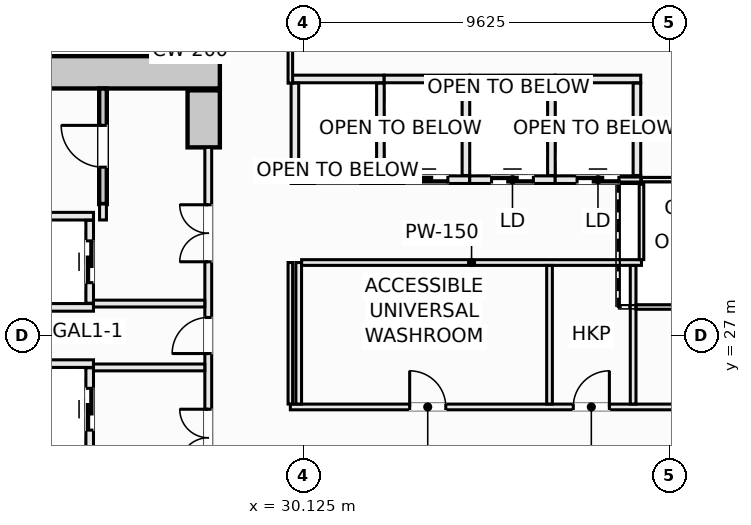
"""IFC4 building model, lengths in metres.
Left out: names, types, materials, properties, quantities, classifications, styles, units other than length and angle.
Written with IfcOpenShell. Run it as: python <this file> out.ifc"""

import sys

from ifc_helpers import new_model, si_unit, direction, frame, frame_2d, origin, place, context, subcontext, project, spatial, rectangle, extrude, element, fill, save


model = new_model("IFC4")
c1 = context("Model", 3, precision=1e-05, world=origin(), true_north=direction((0.0, 1.0)))
c2 = subcontext(c1, "Body", "Model", "MODEL_VIEW")
j1 = project(units=[si_unit("LENGTHUNIT", "METRE"), si_unit("PLANEANGLEUNIT", "RADIAN")], contexts=[c1])
p1 = place(None, origin())
s1 = spatial("IfcSite", under=j1, at=p1, CompositionType="ELEMENT")
p2 = place(p1, origin())
s2 = spatial("IfcBuilding", under=s1, at=p2, CompositionType="ELEMENT")
p3 = place(p2, frame((0.0, 0.0, 10.0)))
s3 = spatial("IfcBuildingStorey", under=s2, at=p3, CompositionType="ELEMENT", Elevation=10.0)
p4 = place(p3, frame((14.075, 33.925, -0.26), z_axis=(0.0, 0.0, 1.0), x_axis=(1.0, 0.0, 0.0)))
e1 = element("IfcWall", 1, at=p4, inside=s3, PredefinedType="SHEAR", context=c2, shape_type="SweptSolid", body=[
    extrude(rectangle(XDim=13.85, YDim=0.85, at=frame_2d((6.925, 0.0))), origin(), (0.0, 0.0, 1.0), 5.02),
])
p5 = place(p3, frame((27.5, 31.95, -0.26), z_axis=(0.0, 0.0, 1.0), x_axis=(0.0, 1.0, 0.0)))
e2 = element("IfcWall", 2, at=p5, inside=s3, PredefinedType="SHEAR", context=c2, shape_type="SweptSolid", body=[
    extrude(rectangle(XDim=1.5, YDim=0.85, at=frame_2d((0.75, 0.0))), origin(), (0.0, 0.0, 1.0), 5.02),
])
p6 = place(p3, frame((24.85, 30.46, -0.26), z_axis=(0.0, 0.0, 1.0), x_axis=(0.0, 1.0, 0.0)))
e3 = element("IfcWall", 3, at=p6, inside=s3, PredefinedType="SHEAR", context=c2, shape_type="SweptSolid", body=[
    extrude(rectangle(XDim=3.038, YDim=0.2, at=frame_2d((1.519, 0.0))), origin(), (0.0, 0.0, 1.0), 5.02),
])
p7 = place(p6, frame((0.969, 0.0, 0.26)))
e4 = element("IfcOpeningElement", 4, at=p7, cuts=e3, PredefinedType="OPENING", context=c2, shape_type="SweptSolid", body=[
    extrude(rectangle(XDim=1.1, YDim=2.15, at=frame_2d((0.55, 1.075))), frame((0.0, 0.11, 0.0), z_axis=(0.0, -1.0, 0.0), x_axis=(1.0, 0.0, 0.0)), (0.0, 0.0, 1.0), 0.22),
])
for number, where, z_axis, x_axis in (
    (5, (22.15, 30.14, 0.0), (0.0, 0.0, 1.0), (1.0, 0.0, 0.0)),
    (6, (22.15, 27.74, 0.0), (0.0, 0.0, 1.0), (1.0, 0.0, 0.0)),
):
    element("IfcWall", number, at=place(p3, frame(where, z_axis=z_axis, x_axis=x_axis)), inside=s3, PredefinedType="SOLIDWALL", context=c2, shape_type="SweptSolid", body=[
        extrude(rectangle(XDim=2.45, YDim=0.2, at=frame_2d((1.225, 0.0))), origin(), (0.0, 0.0, 1.0), 4.76),
    ])
p8 = place(p3, frame((24.5, 27.85, 0.0), z_axis=(0.0, 0.0, 1.0), x_axis=(0.0, 1.0, 0.0)))
e7 = element("IfcWall", 7, at=p8, inside=s3, PredefinedType="SOLIDWALL", context=c2, shape_type="SweptSolid", body=[
    extrude(rectangle(XDim=2.18, YDim=0.2, at=frame_2d((1.09, 0.0))), origin(), (0.0, 0.0, 1.0), 4.76),
])
p9 = place(p8, frame((0.54, 0.0, 0.0)))
e8 = element("IfcOpeningElement", 8, at=p9, cuts=e7, PredefinedType="OPENING", context=c2, shape_type="SweptSolid", body=[
    extrude(rectangle(XDim=1.1, YDim=2.2, at=frame_2d((0.55, 1.1))), frame((0.0, 0.11, 0.0), z_axis=(0.0, -1.0, 0.0), x_axis=(1.0, 0.0, 0.0)), (0.0, 0.0, 1.0), 0.22),
])
p10 = place(p3, frame((22.15, 26.26, 0.0), z_axis=(0.0, 0.0, 1.0), x_axis=(1.0, 0.0, 0.0)))
e9 = element("IfcWall", 9, at=p10, inside=s3, PredefinedType="SOLIDWALL", context=c2, shape_type="SweptSolid", body=[
    extrude(rectangle(XDim=2.45, YDim=0.2, at=frame_2d((1.225, 0.0))), origin(), (0.0, 0.0, 1.0), 4.76),
])
p11 = place(p3, frame((24.5, 23.97, 0.0), z_axis=(0.0, 0.0, 1.0), x_axis=(0.0, 1.0, 0.0)))
e10 = element("IfcWall", 10, at=p11, inside=s3, PredefinedType="SOLIDWALL", context=c2, shape_type="SweptSolid", body=[
    extrude(rectangle(XDim=2.18, YDim=0.2, at=frame_2d((1.09, 0.0))), origin(), (0.0, 0.0, 1.0), 4.76),
])
p12 = place(p11, frame((0.54, 0.0, 0.0)))
e11 = element("IfcOpeningElement", 11, at=p12, cuts=e10, PredefinedType="OPENING", context=c2, shape_type="SweptSolid", body=[
    extrude(rectangle(XDim=1.1, YDim=2.2, at=frame_2d((0.55, 1.1))), frame((0.0, 0.11, 0.0), z_axis=(0.0, -1.0, 0.0), x_axis=(1.0, 0.0, 0.0)), (0.0, 0.0, 1.0), 0.22),
])
p13 = place(p3, frame((29.8, 33.75, 0.0), z_axis=(0.0, 0.0, 1.0), x_axis=(1.0, 0.0, 0.0)))
e12 = element("IfcWall", 12, at=p13, inside=s3, PredefinedType="SOLIDWALL", context=c2, shape_type="SweptSolid", body=[
    extrude(rectangle(XDim=2.45, YDim=0.2, at=frame_2d((1.225, 0.0))), origin(), (0.0, 0.0, 1.0), 4.76),
])
p14 = place(p3, frame((29.8, 31.1, 0.0), z_axis=(0.0, 0.0, 1.0), x_axis=(1.0, 0.0, 0.0)))
e13 = element("IfcWall", 13, at=p14, inside=s3, PredefinedType="SOLIDWALL", context=c2, shape_type="SweptSolid", body=[
    extrude(rectangle(XDim=2.45, YDim=0.2, at=frame_2d((1.225, 0.0))), origin(), (0.0, 0.0, 1.0), 4.76),
])
p15 = place(p14, frame((0.675, 0.0, 0.0)))
e14 = element("IfcOpeningElement", 14, at=p15, cuts=e13, PredefinedType="OPENING", context=c2, shape_type="SweptSolid", body=[
    extrude(rectangle(XDim=1.1, YDim=2.2, at=frame_2d((0.55, 1.1))), frame((0.0, 0.11, 0.0), z_axis=(0.0, -1.0, 0.0), x_axis=(1.0, 0.0, 0.0)), (0.0, 0.0, 1.0), 0.22),
])
for number, where, z_axis, x_axis in (
    (15, (29.9, 31.21, 0.0), (0.0, 0.0, 1.0), (0.0, 1.0, 0.0)),
    (16, (32.15, 31.21, 0.0), (0.0, 0.0, 1.0), (0.0, 1.0, 0.0)),
):
    element("IfcWall", number, at=place(p3, frame(where, z_axis=z_axis, x_axis=x_axis)), inside=s3, PredefinedType="SOLIDWALL", context=c2, shape_type="SweptSolid", body=[
        extrude(rectangle(XDim=2.43, YDim=0.2, at=frame_2d((1.215, 0.0))), origin(), (0.0, 0.0, 1.0), 4.76),
    ])
p16 = place(p3, frame((32.25, 33.75, 0.0), z_axis=(0.0, 0.0, 1.0), x_axis=(1.0, 0.0, 0.0)))
e17 = element("IfcWall", 17, at=p16, inside=s3, PredefinedType="SOLIDWALL", context=c2, shape_type="SweptSolid", body=[
    extrude(rectangle(XDim=2.25, YDim=0.2, at=frame_2d((1.125, 0.0))), origin(), (0.0, 0.0, 1.0), 4.76),
])
p17 = place(p3, frame((32.25, 31.1, 0.0), z_axis=(0.0, 0.0, 1.0), x_axis=(1.0, 0.0, 0.0)))
e18 = element("IfcWall", 18, at=p17, inside=s3, PredefinedType="SOLIDWALL", context=c2, shape_type="SweptSolid", body=[
    extrude(rectangle(XDim=2.25, YDim=0.2, at=frame_2d((1.125, 0.0))), origin(), (0.0, 0.0, 1.0), 4.76),
])
p18 = place(p17, frame((0.575, 0.0, 0.0)))
e19 = element("IfcOpeningElement", 19, at=p18, cuts=e18, PredefinedType="OPENING", context=c2, shape_type="SweptSolid", body=[
    extrude(rectangle(XDim=1.1, YDim=2.2, at=frame_2d((0.55, 1.1))), frame((0.0, 0.11, 0.0), z_axis=(0.0, -1.0, 0.0), x_axis=(1.0, 0.0, 0.0)), (0.0, 0.0, 1.0), 0.22),
])
p19 = place(p3, frame((34.4, 31.21, 0.0), z_axis=(0.0, 0.0, 1.0), x_axis=(0.0, 1.0, 0.0)))
e20 = element("IfcWall", 20, at=p19, inside=s3, PredefinedType="SOLIDWALL", context=c2, shape_type="SweptSolid", body=[
    extrude(rectangle(XDim=2.43, YDim=0.2, at=frame_2d((1.215, 0.0))), origin(), (0.0, 0.0, 1.0), 4.76),
])
p20 = place(p3, frame((34.5, 33.75, 0.0), z_axis=(0.0, 0.0, 1.0), x_axis=(1.0, 0.0, 0.0)))
e21 = element("IfcWall", 21, at=p20, inside=s3, PredefinedType="SOLIDWALL", context=c2, shape_type="SweptSolid", body=[
    extrude(rectangle(XDim=2.25, YDim=0.2, at=frame_2d((1.125, 0.0))), origin(), (0.0, 0.0, 1.0), 4.76),
])
p21 = place(p3, frame((34.5, 31.1, 0.0), z_axis=(0.0, 0.0, 1.0), x_axis=(1.0, 0.0, 0.0)))
e22 = element("IfcWall", 22, at=p21, inside=s3, PredefinedType="SOLIDWALL", context=c2, shape_type="SweptSolid", body=[
    extrude(rectangle(XDim=2.25, YDim=0.2, at=frame_2d((1.125, 0.0))), origin(), (0.0, 0.0, 1.0), 4.76),
])
p22 = place(p21, frame((0.575, 0.0, 0.0)))
e23 = element("IfcOpeningElement", 23, at=p22, cuts=e22, PredefinedType="OPENING", context=c2, shape_type="SweptSolid", body=[
    extrude(rectangle(XDim=1.1, YDim=2.2, at=frame_2d((0.55, 1.1))), frame((0.0, 0.11, 0.0), z_axis=(0.0, -1.0, 0.0), x_axis=(1.0, 0.0, 0.0)), (0.0, 0.0, 1.0), 0.22),
])
p23 = place(p3, frame((36.65, 31.21, 0.0), z_axis=(0.0, 0.0, 1.0), x_axis=(0.0, 1.0, 0.0)))
e24 = element("IfcWall", 24, at=p23, inside=s3, PredefinedType="SOLIDWALL", context=c2, shape_type="SweptSolid", body=[
    extrude(rectangle(XDim=2.43, YDim=0.2, at=frame_2d((1.215, 0.0))), origin(), (0.0, 0.0, 1.0), 4.76),
])
p24 = place(p3, frame((36.75, 33.75, 0.0), z_axis=(0.0, 0.0, 1.0), x_axis=(1.0, 0.0, 0.0)))
e25 = element("IfcWall", 25, at=p24, inside=s3, PredefinedType="SOLIDWALL", context=c2, shape_type="SweptSolid", body=[
    extrude(rectangle(XDim=2.25, YDim=0.2, at=frame_2d((1.125, 0.0))), origin(), (0.0, 0.0, 1.0), 4.76),
])
p25 = place(p3, frame((36.75, 31.1, 0.0), z_axis=(0.0, 0.0, 1.0), x_axis=(1.0, 0.0, 0.0)))
e26 = element("IfcWall", 26, at=p25, inside=s3, PredefinedType="SOLIDWALL", context=c2, shape_type="SweptSolid", body=[
    extrude(rectangle(XDim=2.25, YDim=0.2, at=frame_2d((1.125, 0.0))), origin(), (0.0, 0.0, 1.0), 4.76),
])
p26 = place(p25, frame((0.575, 0.0, 0.0)))
e27 = element("IfcOpeningElement", 27, at=p26, cuts=e26, PredefinedType="OPENING", context=c2, shape_type="SweptSolid", body=[
    extrude(rectangle(XDim=1.1, YDim=2.2, at=frame_2d((0.55, 1.1))), frame((0.0, 0.11, 0.0), z_axis=(0.0, -1.0, 0.0), x_axis=(1.0, 0.0, 0.0)), (0.0, 0.0, 1.0), 0.22),
])
p27 = place(p3, frame((38.9, 31.21, 0.0), z_axis=(0.0, 0.0, 1.0), x_axis=(0.0, 1.0, 0.0)))
e28 = element("IfcWall", 28, at=p27, inside=s3, PredefinedType="SOLIDWALL", context=c2, shape_type="SweptSolid", body=[
    extrude(rectangle(XDim=2.43, YDim=0.2, at=frame_2d((1.215, 0.0))), origin(), (0.0, 0.0, 1.0), 4.76),
])
p28 = place(p3, frame((24.85, 30.04, 0.0), z_axis=(0.0, 0.0, 1.0), x_axis=(0.0, 1.0, 0.0)))
e29 = element("IfcWall", 29, at=p28, inside=s3, PredefinedType="SOLIDWALL", context=c2, shape_type="SweptSolid", body=[
    extrude(rectangle(XDim=0.42, YDim=0.18, at=frame_2d((0.21, 0.0))), origin(), (0.0, 0.0, 1.0), 4.76),
])
p29 = place(p3, frame((27.62, 22.05, 0.0), z_axis=(0.0, 0.0, 1.0), x_axis=(0.0, 1.0, 0.0)))
e30 = element("IfcWall", 30, at=p29, inside=s3, PredefinedType="SOLIDWALL", context=c2, shape_type="SweptSolid", body=[
    extrude(rectangle(XDim=9.9, YDim=0.18, at=frame_2d((4.95, 0.0))), origin(), (0.0, 0.0, 1.0), 3.852),
])
p30 = place(p29, frame((4.475, 0.0, 0.0)))
e31 = element("IfcOpeningElement", 31, at=p30, cuts=e30, PredefinedType="OPENING", context=c2, shape_type="SweptSolid", body=[
    extrude(rectangle(XDim=0.95, YDim=2.1, at=frame_2d((0.475, 1.05))), frame((0.0, 0.1, 0.0), z_axis=(0.0, -1.0, 0.0), x_axis=(1.0, 0.0, 0.0)), (0.0, 0.0, 1.0), 0.2),
])
p31 = place(p29, frame((6.89, 0.0, 0.0)))
e32 = element("IfcOpeningElement", 32, at=p31, cuts=e30, PredefinedType="OPENING", context=c2, shape_type="SweptSolid", body=[
    extrude(rectangle(XDim=1.5, YDim=2.2, at=frame_2d((0.75, 1.1))), frame((0.0, 0.1, 0.0), z_axis=(0.0, -1.0, 0.0), x_axis=(1.0, 0.0, 0.0)), (0.0, 0.0, 1.0), 0.2),
])
p32 = place(p29, frame((1.51, 0.0, 0.0)))
e33 = element("IfcOpeningElement", 33, at=p32, cuts=e30, PredefinedType="OPENING", context=c2, shape_type="SweptSolid", body=[
    extrude(rectangle(XDim=1.5, YDim=2.2, at=frame_2d((0.75, 1.1))), frame((0.0, 0.1, 0.0), z_axis=(0.0, -1.0, 0.0), x_axis=(1.0, 0.0, 0.0)), (0.0, 0.0, 1.0), 0.2),
])
for number, where, z_axis, x_axis in (
    (34, (24.6, 27.84, 0.0), (0.0, 0.0, 1.0), (1.0, 0.0, 0.0)),
    (35, (24.6, 26.16, 0.0), (0.0, 0.0, 1.0), (1.0, 0.0, 0.0)),
):
    element("IfcWall", number, at=place(p3, frame(where, z_axis=z_axis, x_axis=x_axis)), inside=s3, PredefinedType="SOLIDWALL", context=c2, shape_type="SweptSolid", body=[
        extrude(rectangle(XDim=2.928, YDim=0.18, at=frame_2d((1.464, 0.0))), origin(), (0.0, 0.0, 1.0), 4.76),
    ])
p33 = place(p3, frame((29.78, 25.12, 0.0), z_axis=(0.0, 0.0, 1.0), x_axis=(1.0, 0.0, 0.0)))
e36 = element("IfcWall", 36, at=p33, inside=s3, PredefinedType="PARTITIONING", context=c2, shape_type="SweptSolid", body=[
    extrude(rectangle(XDim=15.17, YDim=0.15, at=frame_2d((7.585, 0.0))), origin(), (0.0, 0.0, 1.0), 4.76),
])
p34 = place(p33, frame((3.14, 0.0, 0.0)))
e37 = element("IfcOpeningElement", 37, at=p34, cuts=e36, PredefinedType="OPENING", context=c2, shape_type="SweptSolid", body=[
    extrude(rectangle(XDim=0.95, YDim=2.1, at=frame_2d((0.475, 1.05))), frame((0.0, 0.085, 0.0), z_axis=(0.0, -1.0, 0.0), x_axis=(1.0, 0.0, 0.0)), (0.0, 0.0, 1.0), 0.17),
])
p35 = place(p33, frame((7.445, 0.0, 0.0)))
e38 = element("IfcOpeningElement", 38, at=p35, cuts=e36, PredefinedType="OPENING", context=c2, shape_type="SweptSolid", body=[
    extrude(rectangle(XDim=0.95, YDim=2.1, at=frame_2d((0.475, 1.05))), frame((0.0, 0.085, 0.0), z_axis=(0.0, -1.0, 0.0), x_axis=(1.0, 0.0, 0.0)), (0.0, 0.0, 1.0), 0.17),
])
p36 = place(p3, frame((30.0, 25.197, 0.0), z_axis=(0.0, 0.0, 1.0), x_axis=(0.0, 1.0, 0.0)))
e39 = element("IfcWall", 39, at=p36, inside=s3, PredefinedType="PARTITIONING", context=c2, shape_type="SweptSolid", body=[
    extrude(rectangle(XDim=3.723, YDim=0.15, at=frame_2d((1.861, 0.0))), origin(), (0.0, 0.0, 1.0), 4.76),
])
p37 = place(p3, frame((30.077, 28.92, 0.0), z_axis=(0.0, 0.0, 1.0), x_axis=(1.0, 0.0, 0.0)))
e40 = element("IfcWall", 40, at=p37, inside=s3, PredefinedType="PARTITIONING", context=c2, shape_type="SweptSolid", body=[
    extrude(rectangle(XDim=8.943, YDim=0.15, at=frame_2d((4.472, 0.0))), origin(), (0.0, 0.0, 1.0), 4.76),
])
for number, where, z_axis, x_axis in (
    (41, (36.6, 25.197, 0.0), (0.0, 0.0, 1.0), (0.0, 1.0, 0.0)),
    (42, (38.8, 25.197, 0.0), (0.0, 0.0, 1.0), (0.0, 1.0, 0.0)),
):
    element("IfcWall", number, at=place(p3, frame(where, z_axis=z_axis, x_axis=x_axis)), inside=s3, PredefinedType="PARTITIONING", context=c2, shape_type="SweptSolid", body=[
        extrude(rectangle(XDim=3.646, YDim=0.15, at=frame_2d((1.823, 0.0))), origin(), (0.0, 0.0, 1.0), 4.76),
    ])
p38 = place(p3, frame((27.25, 34.352, 0.0), z_axis=(0.0, 0.0, 1.0), x_axis=(0.0, 1.0, 0.0)))
e43 = element("IfcWall", 43, at=p38, inside=s3, PredefinedType="PARTITIONING", context=c2, shape_type="SweptSolid", body=[
    extrude(rectangle(XDim=0.606, YDim=0.12, at=frame_2d((0.303, 0.0))), origin(), (0.0, 0.0, 1.0), 4.76),
])
p39 = place(p3, frame((29.78, 25.197, 0.0), z_axis=(0.0, 0.0, 1.0), x_axis=(0.0, 1.0, 0.0)))
e44 = element("IfcWall", 44, at=p39, inside=s3, PredefinedType="PARTITIONING", context=c2, shape_type="SweptSolid", body=[
    extrude(rectangle(XDim=3.723, YDim=0.12, at=frame_2d((1.861, 0.0))), origin(), (0.0, 0.0, 1.0), 4.76),
])
p40 = place(p3, frame((29.78, 33.64, 0.0), z_axis=(0.0, 0.0, 1.0), x_axis=(0.0, 1.0, 0.0)))
e45 = element("IfcWall", 45, at=p40, inside=s3, PredefinedType="PARTITIONING", context=c2, shape_type="SweptSolid", body=[
    extrude(rectangle(XDim=4.798, YDim=0.12, at=frame_2d((2.399, 0.0))), origin(), (0.0, 0.0, 1.0), 4.76),
])
p41 = place(p3, frame((39.02, 28.997, 0.0), z_axis=(0.0, 0.0, 1.0), x_axis=(0.0, 1.0, 0.0)))
e46 = element("IfcWall", 46, at=p41, inside=s3, PredefinedType="PARTITIONING", context=c2, shape_type="SweptSolid", body=[
    extrude(rectangle(XDim=1.983, YDim=0.12, at=frame_2d((0.991, 0.0))), origin(), (0.0, 0.0, 1.0), 4.76),
])
p42 = place(p3, frame((38.877, 27.75, 0.0), z_axis=(0.0, 0.0, 1.0), x_axis=(1.0, 0.0, 0.0)))
e47 = element("IfcWall", 47, at=p42, inside=s3, PredefinedType="PARTITIONING", context=c2, shape_type="SweptSolid", body=[
    extrude(rectangle(XDim=5.723, YDim=0.12, at=frame_2d((2.862, 0.0))), origin(), (0.0, 0.0, 1.0), 4.76),
])
p43 = place(p3, frame((39.02, 31.1, 0.0), z_axis=(0.0, 0.0, 1.0), x_axis=(1.0, 0.0, 0.0)))
e48 = element("IfcWall", 48, at=p43, inside=s3, PredefinedType="PARTITIONING", context=c2, shape_type="SweptSolid", body=[
    extrude(rectangle(XDim=5.518, YDim=0.12, at=frame_2d((2.759, 0.0))), origin(), (0.0, 0.0, 1.0), 4.76),
])
p44 = place(p7, origin())
e49 = element("IfcDoor", 49, at=p44, inside=s3, OperationType="SINGLE_SWING_RIGHT", PredefinedType="DOOR", context=c2, shape_type="SweptSolid", body=[
    extrude(rectangle(XDim=1.1, YDim=2.15, at=frame_2d((0.55, 1.075))), frame((0.0, 0.025, 0.0), z_axis=(0.0, -1.0, 0.0), x_axis=(1.0, 0.0, 0.0)), (0.0, 0.0, 1.0), 0.05),
])
fill(e4, e49)
p45 = place(p9, origin())
e50 = element("IfcDoor", 50, at=p45, inside=s3, OperationType="SLIDING_TO_LEFT", PredefinedType="DOOR", context=c2, shape_type="SweptSolid", body=[
    extrude(rectangle(XDim=1.1, YDim=2.2, at=frame_2d((0.55, 1.1))), frame((0.0, 0.025, 0.0), z_axis=(0.0, -1.0, 0.0), x_axis=(1.0, 0.0, 0.0)), (0.0, 0.0, 1.0), 0.05),
])
fill(e8, e50)
p46 = place(p12, origin())
e51 = element("IfcDoor", 51, at=p46, inside=s3, OperationType="SLIDING_TO_LEFT", PredefinedType="DOOR", context=c2, shape_type="SweptSolid", body=[
    extrude(rectangle(XDim=1.1, YDim=2.2, at=frame_2d((0.55, 1.1))), frame((0.0, 0.025, 0.0), z_axis=(0.0, -1.0, 0.0), x_axis=(1.0, 0.0, 0.0)), (0.0, 0.0, 1.0), 0.05),
])
fill(e11, e51)
p47 = place(p15, origin())
e52 = element("IfcDoor", 52, at=p47, inside=s3, OperationType="SLIDING_TO_LEFT", PredefinedType="DOOR", context=c2, shape_type="SweptSolid", body=[
    extrude(rectangle(XDim=1.1, YDim=2.2, at=frame_2d((0.55, 1.1))), frame((0.0, 0.025, 0.0), z_axis=(0.0, -1.0, 0.0), x_axis=(1.0, 0.0, 0.0)), (0.0, 0.0, 1.0), 0.05),
])
fill(e14, e52)
p48 = place(p18, origin())
e53 = element("IfcDoor", 53, at=p48, inside=s3, OperationType="SLIDING_TO_LEFT", PredefinedType="DOOR", context=c2, shape_type="SweptSolid", body=[
    extrude(rectangle(XDim=1.1, YDim=2.2, at=frame_2d((0.55, 1.1))), frame((0.0, 0.025, 0.0), z_axis=(0.0, -1.0, 0.0), x_axis=(1.0, 0.0, 0.0)), (0.0, 0.0, 1.0), 0.05),
])
fill(e19, e53)
p49 = place(p22, origin())
e54 = element("IfcDoor", 54, at=p49, inside=s3, OperationType="SLIDING_TO_LEFT", PredefinedType="DOOR", context=c2, shape_type="SweptSolid", body=[
    extrude(rectangle(XDim=1.1, YDim=2.2, at=frame_2d((0.55, 1.1))), frame((0.0, 0.025, 0.0), z_axis=(0.0, -1.0, 0.0), x_axis=(1.0, 0.0, 0.0)), (0.0, 0.0, 1.0), 0.05),
])
fill(e23, e54)
p50 = place(p26, origin())
e55 = element("IfcDoor", 55, at=p50, inside=s3, OperationType="SLIDING_TO_LEFT", PredefinedType="DOOR", context=c2, shape_type="SweptSolid", body=[
    extrude(rectangle(XDim=1.1, YDim=2.2, at=frame_2d((0.55, 1.1))), frame((0.0, 0.025, 0.0), z_axis=(0.0, -1.0, 0.0), x_axis=(1.0, 0.0, 0.0)), (0.0, 0.0, 1.0), 0.05),
])
fill(e27, e55)
p51 = place(p30, origin())
e56 = element("IfcDoor", 56, at=p51, inside=s3, OperationType="SINGLE_SWING_LEFT", PredefinedType="DOOR", context=c2, shape_type="SweptSolid", body=[
    extrude(rectangle(XDim=0.95, YDim=2.1, at=frame_2d((0.475, 1.05))), frame((0.0, 0.025, 0.0), z_axis=(0.0, -1.0, 0.0), x_axis=(1.0, 0.0, 0.0)), (0.0, 0.0, 1.0), 0.05),
])
fill(e31, e56)
p52 = place(p31, origin())
e57 = element("IfcDoor", 57, at=p52, inside=s3, OperationType="DOUBLE_DOOR_SINGLE_SWING", PredefinedType="DOOR", context=c2, shape_type="SweptSolid", body=[
    extrude(rectangle(XDim=1.5, YDim=2.2, at=frame_2d((0.75, 1.1))), frame((0.0, 0.025, 0.0), z_axis=(0.0, -1.0, 0.0), x_axis=(1.0, 0.0, 0.0)), (0.0, 0.0, 1.0), 0.05),
])
fill(e32, e57)
p53 = place(p32, origin())
e58 = element("IfcDoor", 58, at=p53, inside=s3, OperationType="DOUBLE_DOOR_SINGLE_SWING", PredefinedType="DOOR", context=c2, shape_type="SweptSolid", body=[
    extrude(rectangle(XDim=1.5, YDim=2.2, at=frame_2d((0.75, 1.1))), frame((0.0, 0.025, 0.0), z_axis=(0.0, -1.0, 0.0), x_axis=(1.0, 0.0, 0.0)), (0.0, 0.0, 1.0), 0.05),
])
fill(e33, e58)
p54 = place(p34, origin())
e59 = element("IfcDoor", 59, at=p54, inside=s3, OperationType="SINGLE_SWING_LEFT", PredefinedType="DOOR", context=c2, shape_type="SweptSolid", body=[
    extrude(rectangle(XDim=0.95, YDim=2.1, at=frame_2d((0.475, 1.05))), frame((0.0, 0.025, 0.0), z_axis=(0.0, -1.0, 0.0), x_axis=(1.0, 0.0, 0.0)), (0.0, 0.0, 1.0), 0.05),
])
fill(e37, e59)
p55 = place(p35, origin())
e60 = element("IfcDoor", 60, at=p55, inside=s3, OperationType="SINGLE_SWING_RIGHT", PredefinedType="DOOR", context=c2, shape_type="SweptSolid", body=[
    extrude(rectangle(XDim=0.95, YDim=2.1, at=frame_2d((0.475, 1.05))), frame((0.0, 0.025, 0.0), z_axis=(0.0, -1.0, 0.0), x_axis=(1.0, 0.0, 0.0)), (0.0, 0.0, 1.0), 0.05),
])
fill(e38, e60)
save(model, sys.argv[1])
